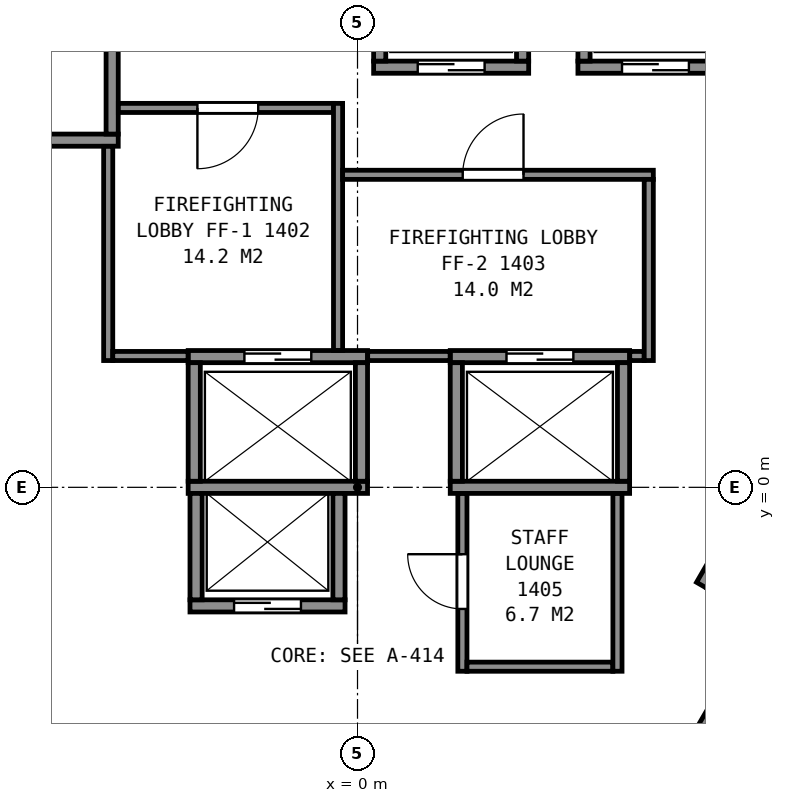
"""IFC4 building model, lengths in metres.
Left out: names, types, materials, properties, quantities, classifications, styles, units other than length and angle.
Written with IfcOpenShell. Run it as: python <this file> out.ifc"""

import sys

from ifc_helpers import new_model, si_unit, direction, frame, frame_2d, origin, place, context, subcontext, project, spatial, rectangle, extrude, element, fill, save


model = new_model("IFC4")
c1 = context("Model", 3, precision=1e-05, world=origin(), true_north=direction((0.0, 1.0)))
c2 = subcontext(c1, "Body", "Model", "MODEL_VIEW")
j1 = project(units=[si_unit("LENGTHUNIT", "METRE"), si_unit("PLANEANGLEUNIT", "RADIAN")], contexts=[c1])
p1 = place(None, origin())
s1 = spatial("IfcSite", under=j1, at=p1, CompositionType="ELEMENT")
p2 = place(p1, origin())
s2 = spatial("IfcBuilding", under=s1, at=p2, CompositionType="ELEMENT")
p3 = place(p2, frame((0.0, 0.0, 65.6)))
s3 = spatial("IfcBuildingStorey", under=s2, at=p3, CompositionType="ELEMENT", Elevation=65.6)
p4 = place(p3, frame((-2.755, -1.95, 0.0), z_axis=(0.0, 0.0, 1.0), x_axis=(1.0, 0.0, 0.0)))
e1 = element("IfcWall", 1, at=p4, inside=s3, PredefinedType="PARTITIONING", context=c2, shape_type="SweptSolid", body=[
    extrude(rectangle(XDim=2.55, YDim=0.2, at=frame_2d((1.275, 0.0))), origin(), (0.0, 0.0, 1.0), 3.6),
])
p5 = place(p4, frame((0.725, 0.0, 0.0)))
e2 = element("IfcOpeningElement", 2, at=p5, cuts=e1, PredefinedType="OPENING", context=c2, shape_type="SweptSolid", body=[
    extrude(rectangle(XDim=1.1, YDim=2.1, at=frame_2d((0.55, 1.05))), frame((0.0, 0.11, 0.0), z_axis=(0.0, -1.0, 0.0), x_axis=(1.0, 0.0, 0.0)), (0.0, 0.0, 1.0), 0.22),
])
p6 = place(p3, frame((-2.785, 0.0, 0.0), z_axis=(0.0, 0.0, 1.0), x_axis=(1.0, 0.0, 0.0)))
e3 = element("IfcWall", 3, at=p6, inside=s3, PredefinedType="PARTITIONING", context=c2, shape_type="SweptSolid", body=[
    extrude(rectangle(XDim=2.95, YDim=0.2, at=frame_2d((1.475, 0.0))), origin(), (0.0, 0.0, 1.0), 3.6),
])
p7 = place(p3, frame((1.525, 0.0, 0.0), z_axis=(0.0, 0.0, 1.0), x_axis=(1.0, 0.0, 0.0)))
e4 = element("IfcWall", 4, at=p7, inside=s3, PredefinedType="PARTITIONING", context=c2, shape_type="SweptSolid", body=[
    extrude(rectangle(XDim=2.95, YDim=0.2, at=frame_2d((1.475, 0.0))), origin(), (0.0, 0.0, 1.0), 3.6),
])
p8 = place(p3, frame((-2.785, 2.15, 0.0), z_axis=(0.0, 0.0, 1.0), x_axis=(1.0, 0.0, 0.0)))
e5 = element("IfcWall", 5, at=p8, inside=s3, PredefinedType="PARTITIONING", context=c2, shape_type="SweptSolid", body=[
    extrude(rectangle(XDim=2.95, YDim=0.2, at=frame_2d((1.475, 0.0))), origin(), (0.0, 0.0, 1.0), 3.6),
])
p9 = place(p8, frame((0.925, 0.0, 0.0)))
e6 = element("IfcOpeningElement", 6, at=p9, cuts=e5, PredefinedType="OPENING", context=c2, shape_type="SweptSolid", body=[
    extrude(rectangle(XDim=1.1, YDim=2.1, at=frame_2d((0.55, 1.05))), frame((0.0, 0.11, 0.0), z_axis=(0.0, -1.0, 0.0), x_axis=(1.0, 0.0, 0.0)), (0.0, 0.0, 1.0), 0.22),
])
p10 = place(p3, frame((1.525, 2.15, 0.0), z_axis=(0.0, 0.0, 1.0), x_axis=(1.0, 0.0, 0.0)))
e7 = element("IfcWall", 7, at=p10, inside=s3, PredefinedType="PARTITIONING", context=c2, shape_type="SweptSolid", body=[
    extrude(rectangle(XDim=2.95, YDim=0.2, at=frame_2d((1.475, 0.0))), origin(), (0.0, 0.0, 1.0), 3.6),
])
p11 = place(p10, frame((0.925, 0.0, 0.0)))
e8 = element("IfcOpeningElement", 8, at=p11, cuts=e7, PredefinedType="OPENING", context=c2, shape_type="SweptSolid", body=[
    extrude(rectangle(XDim=1.1, YDim=2.1, at=frame_2d((0.55, 1.05))), frame((0.0, 0.11, 0.0), z_axis=(0.0, -1.0, 0.0), x_axis=(1.0, 0.0, 0.0)), (0.0, 0.0, 1.0), 0.22),
])
p12 = place(p3, frame((-6.285, 5.71, 0.0), z_axis=(0.0, 0.0, 1.0), x_axis=(1.0, 0.0, 0.0)))
e9 = element("IfcWall", 9, at=p12, inside=s3, PredefinedType="PARTITIONING", context=c2, shape_type="SweptSolid", body=[
    extrude(rectangle(XDim=2.35, YDim=0.2, at=frame_2d((1.175, 0.0))), origin(), (0.0, 0.0, 1.0), 3.6),
])
p13 = place(p3, frame((0.265, 6.91, 0.0), z_axis=(0.0, 0.0, 1.0), x_axis=(1.0, 0.0, 0.0)))
e10 = element("IfcWall", 10, at=p13, inside=s3, PredefinedType="PARTITIONING", context=c2, shape_type="SweptSolid", body=[
    extrude(rectangle(XDim=2.55, YDim=0.2, at=frame_2d((1.275, 0.0))), origin(), (0.0, 0.0, 1.0), 3.6),
])
p14 = place(p13, frame((0.725, 0.0, 0.0)))
e11 = element("IfcOpeningElement", 11, at=p14, cuts=e10, PredefinedType="OPENING", context=c2, shape_type="SweptSolid", body=[
    extrude(rectangle(XDim=1.1, YDim=2.1, at=frame_2d((0.55, 1.05))), frame((0.0, 0.11, 0.0), z_axis=(0.0, -1.0, 0.0), x_axis=(1.0, 0.0, 0.0)), (0.0, 0.0, 1.0), 0.22),
])
p15 = place(p3, frame((3.625, 6.91, 0.0), z_axis=(0.0, 0.0, 1.0), x_axis=(1.0, 0.0, 0.0)))
e12 = element("IfcWall", 12, at=p15, inside=s3, PredefinedType="PARTITIONING", context=c2, shape_type="SweptSolid", body=[
    extrude(rectangle(XDim=2.55, YDim=0.2, at=frame_2d((1.275, 0.0))), origin(), (0.0, 0.0, 1.0), 3.6),
])
p16 = place(p15, frame((0.725, 0.0, 0.0)))
e13 = element("IfcOpeningElement", 13, at=p16, cuts=e12, PredefinedType="OPENING", context=c2, shape_type="SweptSolid", body=[
    extrude(rectangle(XDim=1.1, YDim=2.1, at=frame_2d((0.55, 1.05))), frame((0.0, 0.11, 0.0), z_axis=(0.0, -1.0, 0.0), x_axis=(1.0, 0.0, 0.0)), (0.0, 0.0, 1.0), 0.22),
])
p17 = place(p3, frame((5.527, -4.247, 0.0), z_axis=(0.0, 0.0, 1.0), x_axis=(0.499938297808, 0.866061024631, 0.0)))
e14 = element("IfcWall", 14, at=p17, inside=s3, PredefinedType="PARTITIONING", context=c2, shape_type="SweptSolid", body=[
    extrude(rectangle(XDim=2.35, YDim=0.2, at=frame_2d((1.175, 0.0))), origin(), (0.0, 0.0, 1.0), 3.6),
])
p18 = place(p17, frame((0.725, 0.0, 0.0)))
e15 = element("IfcOpeningElement", 15, at=p18, cuts=e14, PredefinedType="OPENING", context=c2, shape_type="SweptSolid", body=[
    extrude(rectangle(XDim=1.1, YDim=2.1, at=frame_2d((0.55, 1.05))), frame((0.0, 0.11, 0.0), z_axis=(0.0, -1.0, 0.0), x_axis=(1.0, 0.0, 0.0)), (0.0, 0.0, 1.0), 0.22),
])
p19 = place(p3, frame((5.663, -1.612, 0.0), z_axis=(0.0, 0.0, 1.0), x_axis=(0.49998122708, 0.866036242063, 0.0)))
e16 = element("IfcWall", 16, at=p19, inside=s3, PredefinedType="PARTITIONING", context=c2, shape_type="SweptSolid", body=[
    extrude(rectangle(XDim=4.9, YDim=0.2, at=frame_2d((2.45, 0.0))), origin(), (0.0, 0.0, 1.0), 3.6),
])
p20 = place(p3, frame((4.375, 0.1, 0.0), z_axis=(0.0, 0.0, 1.0), x_axis=(0.0, 1.0, 0.0)))
e17 = element("IfcWall", 17, at=p20, inside=s3, PredefinedType="PARTITIONING", context=c2, shape_type="SweptSolid", body=[
    extrude(rectangle(XDim=1.95, YDim=0.2, at=frame_2d((0.975, 0.0))), origin(), (0.0, 0.0, 1.0), 3.6),
])
for number, where, z_axis, x_axis in (
    (18, (3.725, 7.01, 0.0), (0.0, 0.0, 1.0), (0.0, 1.0, 0.0)),
    (19, (2.715, 7.01, 0.0), (0.0, 0.0, 1.0), (0.0, 1.0, 0.0)),
):
    element("IfcWall", number, at=place(p3, frame(where, z_axis=z_axis, x_axis=x_axis)), inside=s3, PredefinedType="PARTITIONING", context=c2, shape_type="SweptSolid", body=[
        extrude(rectangle(XDim=1.75, YDim=0.2, at=frame_2d((0.875, 0.0))), origin(), (0.0, 0.0, 1.0), 3.6),
    ])
p21 = place(p3, frame((1.625, 0.1, 0.0), z_axis=(0.0, 0.0, 1.0), x_axis=(0.0, 1.0, 0.0)))
e20 = element("IfcWall", 20, at=p21, inside=s3, PredefinedType="PARTITIONING", context=c2, shape_type="SweptSolid", body=[
    extrude(rectangle(XDim=1.95, YDim=0.2, at=frame_2d((0.975, 0.0))), origin(), (0.0, 0.0, 1.0), 3.6),
])
p22 = place(p3, frame((0.365, 7.01, 0.0), z_axis=(0.0, 0.0, 1.0), x_axis=(0.0, 1.0, 0.0)))
e21 = element("IfcWall", 21, at=p22, inside=s3, PredefinedType="PARTITIONING", context=c2, shape_type="SweptSolid", body=[
    extrude(rectangle(XDim=1.75, YDim=0.2, at=frame_2d((0.875, 0.0))), origin(), (0.0, 0.0, 1.0), 3.6),
])
p23 = place(p3, frame((0.065, 0.1, 0.0), z_axis=(0.0, 0.0, 1.0), x_axis=(0.0, 1.0, 0.0)))
e22 = element("IfcWall", 22, at=p23, inside=s3, PredefinedType="PARTITIONING", context=c2, shape_type="SweptSolid", body=[
    extrude(rectangle(XDim=1.95, YDim=0.2, at=frame_2d((0.975, 0.0))), origin(), (0.0, 0.0, 1.0), 3.6),
])
for number, where, z_axis, x_axis in (
    (23, (-0.305, -1.85, 0.0), (0.0, 0.0, 1.0), (0.0, 1.0, 0.0)),
    (24, (-2.655, -1.85, 0.0), (0.0, 0.0, 1.0), (0.0, 1.0, 0.0)),
):
    element("IfcWall", number, at=place(p3, frame(where, z_axis=z_axis, x_axis=x_axis)), inside=s3, PredefinedType="PARTITIONING", context=c2, shape_type="SweptSolid", body=[
        extrude(rectangle(XDim=1.75, YDim=0.2, at=frame_2d((0.875, 0.0))), origin(), (0.0, 0.0, 1.0), 3.6),
    ])
p24 = place(p3, frame((-2.685, 0.1, 0.0), z_axis=(0.0, 0.0, 1.0), x_axis=(0.0, 1.0, 0.0)))
e25 = element("IfcWall", 25, at=p24, inside=s3, PredefinedType="PARTITIONING", context=c2, shape_type="SweptSolid", body=[
    extrude(rectangle(XDim=1.95, YDim=0.2, at=frame_2d((0.975, 0.0))), origin(), (0.0, 0.0, 1.0), 3.6),
])
p25 = place(p3, frame((-4.035, 5.81, 0.0), z_axis=(0.0, 0.0, 1.0), x_axis=(0.0, 1.0, 0.0)))
e26 = element("IfcWall", 26, at=p25, inside=s3, PredefinedType="PARTITIONING", context=c2, shape_type="SweptSolid", body=[
    extrude(rectangle(XDim=1.75, YDim=0.2, at=frame_2d((0.875, 0.0))), origin(), (0.0, 0.0, 1.0), 3.6),
])
p26 = place(p3, frame((-13.664, 5.946, 0.0), z_axis=(0.0, 0.0, 1.0), x_axis=(0.499994327219, -0.866028678941, 0.0)))
e27 = element("IfcWall", 27, at=p26, inside=s3, PredefinedType="PARTITIONING", context=c2, shape_type="SweptSolid", body=[
    extrude(rectangle(XDim=23.968, YDim=0.2, at=frame_2d((11.984, 0.0))), origin(), (0.0, 0.0, 1.0), 3.35),
])
p27 = place(p3, frame((-4.152, -5.729, 0.0), z_axis=(0.0, 0.0, 1.0), x_axis=(-0.500024287448, 0.866011380966, 0.0)))
e28 = element("IfcWall", 28, at=p27, inside=s3, PredefinedType="PARTITIONING", context=c2, shape_type="SweptSolid", body=[
    extrude(rectangle(XDim=3.501, YDim=0.15, at=frame_2d((1.75, 0.0))), origin(), (0.0, 0.0, 1.0), 3.35),
])
p28 = place(p27, frame((2.026, 0.0, 0.0)))
e29 = element("IfcOpeningElement", 29, at=p28, cuts=e28, PredefinedType="OPENING", context=c2, shape_type="SweptSolid", body=[
    extrude(rectangle(XDim=0.9, YDim=2.1, at=frame_2d((0.45, 1.05))), frame((0.0, 0.085, 0.0), z_axis=(0.0, -1.0, 0.0), x_axis=(1.0, 0.0, 0.0)), (0.0, 0.0, 1.0), 0.17),
])
p29 = place(p27, frame((0.248, 0.0, 0.0)))
e30 = element("IfcOpeningElement", 30, at=p29, cuts=e28, PredefinedType="OPENING", context=c2, shape_type="SweptSolid", body=[
    extrude(rectangle(XDim=0.9, YDim=2.1, at=frame_2d((0.45, 1.05))), frame((0.0, 0.085, 0.0), z_axis=(0.0, -1.0, 0.0), x_axis=(1.0, 0.0, 0.0)), (0.0, 0.0, 1.0), 0.17),
])
p30 = place(p3, frame((-4.1, 2.085, 0.0), z_axis=(0.0, 0.0, 1.0), x_axis=(0.0, 1.0, 0.0)))
e31 = element("IfcWall", 31, at=p30, inside=s3, PredefinedType="PARTITIONING", context=c2, shape_type="SweptSolid", body=[
    extrude(rectangle(XDim=3.523, YDim=0.15, at=frame_2d((1.761, 0.0))), origin(), (0.0, 0.0, 1.0), 3.35),
])
p31 = place(p3, frame((-4.025, 2.16, 0.0), z_axis=(0.0, 0.0, 1.0), x_axis=(1.0, 0.0, 0.0)))
e32 = element("IfcWall", 32, at=p31, inside=s3, PredefinedType="PARTITIONING", context=c2, shape_type="SweptSolid", body=[
    extrude(rectangle(XDim=1.238, YDim=0.15, at=frame_2d((0.619, 0.0))), origin(), (0.0, 0.0, 1.0), 3.35),
])
p32 = place(p3, frame((-3.933, 6.24, 0.0), z_axis=(0.0, 0.0, 1.0), x_axis=(1.0, 0.0, 0.0)))
e33 = element("IfcWall", 33, at=p32, inside=s3, PredefinedType="PARTITIONING", context=c2, shape_type="SweptSolid", body=[
    extrude(rectangle(XDim=3.538, YDim=0.15, at=frame_2d((1.769, 0.0))), origin(), (0.0, 0.0, 1.0), 3.35),
])
p33 = place(p32, frame((1.3, 0.0, 0.0)))
e34 = element("IfcOpeningElement", 34, at=p33, cuts=e33, PredefinedType="OPENING", context=c2, shape_type="SweptSolid", body=[
    extrude(rectangle(XDim=1.0, YDim=2.1, at=frame_2d((0.5, 1.05))), frame((0.0, 0.085, 0.0), z_axis=(0.0, -1.0, 0.0), x_axis=(1.0, 0.0, 0.0)), (0.0, 0.0, 1.0), 0.17),
])
p34 = place(p3, frame((-0.32, 2.252, 0.0), z_axis=(0.0, 0.0, 1.0), x_axis=(0.0, 1.0, 0.0)))
e35 = element("IfcWall", 35, at=p34, inside=s3, PredefinedType="PARTITIONING", context=c2, shape_type="SweptSolid", body=[
    extrude(rectangle(XDim=4.063, YDim=0.15, at=frame_2d((2.031, 0.0))), origin(), (0.0, 0.0, 1.0), 3.35),
])
p35 = place(p3, frame((-0.245, 5.14, 0.0), z_axis=(0.0, 0.0, 1.0), x_axis=(1.0, 0.0, 0.0)))
e36 = element("IfcWall", 36, at=p35, inside=s3, PredefinedType="PARTITIONING", context=c2, shape_type="SweptSolid", body=[
    extrude(rectangle(XDim=5.11, YDim=0.15, at=frame_2d((2.555, 0.0))), origin(), (0.0, 0.0, 1.0), 3.35),
])
p36 = place(p35, frame((1.975, 0.0, 0.0)))
e37 = element("IfcOpeningElement", 37, at=p36, cuts=e36, PredefinedType="OPENING", context=c2, shape_type="SweptSolid", body=[
    extrude(rectangle(XDim=1.0, YDim=2.1, at=frame_2d((0.5, 1.05))), frame((0.0, 0.085, 0.0), z_axis=(0.0, -1.0, 0.0), x_axis=(1.0, 0.0, 0.0)), (0.0, 0.0, 1.0), 0.17),
])
p37 = place(p3, frame((0.167, 2.16, 0.0), z_axis=(0.0, 0.0, 1.0), x_axis=(1.0, 0.0, 0.0)))
e38 = element("IfcWall", 38, at=p37, inside=s3, PredefinedType="PARTITIONING", context=c2, shape_type="SweptSolid", body=[
    extrude(rectangle(XDim=1.356, YDim=0.15, at=frame_2d((0.678, 0.0))), origin(), (0.0, 0.0, 1.0), 3.35),
])
p38 = place(p3, frame((1.725, -0.102, 0.0), z_axis=(0.0, 0.0, 1.0), x_axis=(0.0, -1.0, 0.0)))
e39 = element("IfcWall", 39, at=p38, inside=s3, PredefinedType="PARTITIONING", context=c2, shape_type="SweptSolid", body=[
    extrude(rectangle(XDim=2.923, YDim=0.15, at=frame_2d((1.461, 0.0))), origin(), (0.0, 0.0, 1.0), 3.35),
])
p39 = place(p38, frame((0.998, 0.0, 0.0)))
e40 = element("IfcOpeningElement", 40, at=p39, cuts=e39, PredefinedType="OPENING", context=c2, shape_type="SweptSolid", body=[
    extrude(rectangle(XDim=0.9, YDim=2.1, at=frame_2d((0.45, 1.05))), frame((0.0, 0.085, 0.0), z_axis=(0.0, -1.0, 0.0), x_axis=(1.0, 0.0, 0.0)), (0.0, 0.0, 1.0), 0.17),
])
p40 = place(p3, frame((1.8, -2.95, 0.0), z_axis=(0.0, 0.0, 1.0), x_axis=(1.0, 0.0, 0.0)))
e41 = element("IfcWall", 41, at=p40, inside=s3, PredefinedType="PARTITIONING", context=c2, shape_type="SweptSolid", body=[
    extrude(rectangle(XDim=2.4, YDim=0.15, at=frame_2d((1.2, 0.0))), origin(), (0.0, 0.0, 1.0), 3.35),
])
p41 = place(p3, frame((4.275, -3.025, 0.0), z_axis=(0.0, 0.0, 1.0), x_axis=(0.0, 1.0, 0.0)))
e42 = element("IfcWall", 42, at=p41, inside=s3, PredefinedType="PARTITIONING", context=c2, shape_type="SweptSolid", body=[
    extrude(rectangle(XDim=2.923, YDim=0.15, at=frame_2d((1.461, 0.0))), origin(), (0.0, 0.0, 1.0), 3.35),
])
p42 = place(p3, frame((4.477, 2.16, 0.0), z_axis=(0.0, 0.0, 1.0), x_axis=(1.0, 0.0, 0.0)))
e43 = element("IfcWall", 43, at=p42, inside=s3, PredefinedType="PARTITIONING", context=c2, shape_type="SweptSolid", body=[
    extrude(rectangle(XDim=0.238, YDim=0.15, at=frame_2d((0.119, 0.0))), origin(), (0.0, 0.0, 1.0), 3.35),
])
p43 = place(p3, frame((4.79, 2.085, 0.0), z_axis=(0.0, 0.0, 1.0), x_axis=(0.0, 1.0, 0.0)))
e44 = element("IfcWall", 44, at=p43, inside=s3, PredefinedType="PARTITIONING", context=c2, shape_type="SweptSolid", body=[
    extrude(rectangle(XDim=2.98, YDim=0.15, at=frame_2d((1.49, 0.0))), origin(), (0.0, 0.0, 1.0), 3.35),
])
p44 = place(p3, frame((-3.766, -18.358, 0.0), z_axis=(0.0, 0.0, 1.0), x_axis=(-0.500003973642, 0.866023109589, 0.0)))
e45 = element("IfcWall", 45, at=p44, inside=s3, PredefinedType="PARTITIONING", context=c2, shape_type="SweptSolid", body=[
    extrude(rectangle(XDim=28.826, YDim=0.125, at=frame_2d((14.413, 0.0))), origin(), (0.0, 0.0, 1.0), 2.613),
])
p45 = place(p44, frame((27.114, 0.0, 0.0)))
e46 = element("IfcOpeningElement", 46, at=p45, cuts=e45, PredefinedType="OPENING", context=c2, shape_type="SweptSolid", body=[
    extrude(rectangle(XDim=0.9, YDim=2.1, at=frame_2d((0.45, 1.05))), frame((0.0, 0.073, 0.0), z_axis=(0.0, -1.0, 0.0), x_axis=(1.0, 0.0, 0.0)), (0.0, 0.0, 1.0), 0.145),
])
p46 = place(p44, frame((20.322, 0.0, 0.0)))
e47 = element("IfcOpeningElement", 47, at=p46, cuts=e45, PredefinedType="OPENING", context=c2, shape_type="SweptSolid", body=[
    extrude(rectangle(XDim=0.9, YDim=2.1, at=frame_2d((0.45, 1.05))), frame((0.0, 0.073, 0.0), z_axis=(0.0, -1.0, 0.0), x_axis=(1.0, 0.0, 0.0)), (0.0, 0.0, 1.0), 0.145),
])
p47 = place(p44, frame((17.68, 0.0, 0.0)))
e48 = element("IfcOpeningElement", 48, at=p47, cuts=e45, PredefinedType="OPENING", context=c2, shape_type="SweptSolid", body=[
    extrude(rectangle(XDim=0.9, YDim=2.1, at=frame_2d((0.45, 1.05))), frame((0.0, 0.073, 0.0), z_axis=(0.0, -1.0, 0.0), x_axis=(1.0, 0.0, 0.0)), (0.0, 0.0, 1.0), 0.145),
])
p48 = place(p44, frame((10.836, 0.0, 0.0)))
e49 = element("IfcOpeningElement", 49, at=p48, cuts=e45, PredefinedType="OPENING", context=c2, shape_type="SweptSolid", body=[
    extrude(rectangle(XDim=0.9, YDim=2.1, at=frame_2d((0.45, 1.05))), frame((0.0, 0.073, 0.0), z_axis=(0.0, -1.0, 0.0), x_axis=(1.0, 0.0, 0.0)), (0.0, 0.0, 1.0), 0.145),
])
p49 = place(p44, frame((7.342, 0.0, 0.0)))
e50 = element("IfcOpeningElement", 50, at=p49, cuts=e45, PredefinedType="OPENING", context=c2, shape_type="SweptSolid", body=[
    extrude(rectangle(XDim=0.9, YDim=2.1, at=frame_2d((0.45, 1.05))), frame((0.0, 0.073, 0.0), z_axis=(0.0, -1.0, 0.0), x_axis=(1.0, 0.0, 0.0)), (0.0, 0.0, 1.0), 0.145),
])
p50 = place(p3, frame((18.179, 6.606, 0.0), z_axis=(0.0, 0.0, 1.0), x_axis=(-0.500003973642, -0.866023109589, 0.0)))
e51 = element("IfcWall", 51, at=p50, inside=s3, PredefinedType="PARTITIONING", context=c2, shape_type="SweptSolid", body=[
    extrude(rectangle(XDim=28.826, YDim=0.125, at=frame_2d((14.413, 0.0))), origin(), (0.0, 0.0, 1.0), 2.613),
])
p51 = place(p50, frame((21.501, 0.0, 0.0)))
e52 = element("IfcOpeningElement", 52, at=p51, cuts=e51, PredefinedType="OPENING", context=c2, shape_type="SweptSolid", body=[
    extrude(rectangle(XDim=0.9, YDim=2.1, at=frame_2d((0.45, 1.05))), frame((0.0, 0.073, 0.0), z_axis=(0.0, -1.0, 0.0), x_axis=(1.0, 0.0, 0.0)), (0.0, 0.0, 1.0), 0.145),
])
p52 = place(p50, frame((18.894, 0.0, 0.0)))
e53 = element("IfcOpeningElement", 53, at=p52, cuts=e51, PredefinedType="OPENING", context=c2, shape_type="SweptSolid", body=[
    extrude(rectangle(XDim=0.9, YDim=2.1, at=frame_2d((0.45, 1.05))), frame((0.0, 0.073, 0.0), z_axis=(0.0, -1.0, 0.0), x_axis=(1.0, 0.0, 0.0)), (0.0, 0.0, 1.0), 0.145),
])
p53 = place(p50, frame((10.937, 0.0, 0.0)))
e54 = element("IfcOpeningElement", 54, at=p53, cuts=e51, PredefinedType="OPENING", context=c2, shape_type="SweptSolid", body=[
    extrude(rectangle(XDim=0.9, YDim=2.1, at=frame_2d((0.45, 1.05))), frame((0.0, 0.073, 0.0), z_axis=(0.0, -1.0, 0.0), x_axis=(1.0, 0.0, 0.0)), (0.0, 0.0, 1.0), 0.145),
])
p54 = place(p50, frame((7.535, 0.0, 0.0)))
e55 = element("IfcOpeningElement", 55, at=p54, cuts=e51, PredefinedType="OPENING", context=c2, shape_type="SweptSolid", body=[
    extrude(rectangle(XDim=0.9, YDim=2.1, at=frame_2d((0.45, 1.05))), frame((0.0, 0.073, 0.0), z_axis=(0.0, -1.0, 0.0), x_axis=(1.0, 0.0, 0.0)), (0.0, 0.0, 1.0), 0.145),
])
p55 = place(p50, frame((0.827, 0.0, 0.0)))
e56 = element("IfcOpeningElement", 56, at=p55, cuts=e51, PredefinedType="OPENING", context=c2, shape_type="SweptSolid", body=[
    extrude(rectangle(XDim=0.9, YDim=2.1, at=frame_2d((0.45, 1.05))), frame((0.0, 0.073, 0.0), z_axis=(0.0, -1.0, 0.0), x_axis=(1.0, 0.0, 0.0)), (0.0, 0.0, 1.0), 0.145),
])
p56 = place(p14, origin())
e57 = element("IfcDoor", 57, at=p56, inside=s3, OperationType="SLIDING_TO_LEFT", PredefinedType="DOOR", context=c2, shape_type="SweptSolid", body=[
    extrude(rectangle(XDim=1.1, YDim=2.1, at=frame_2d((0.55, 1.05))), frame((0.0, 0.025, 0.0), z_axis=(0.0, -1.0, 0.0), x_axis=(1.0, 0.0, 0.0)), (0.0, 0.0, 1.0), 0.05),
])
fill(e11, e57)
p57 = place(p5, origin())
e58 = element("IfcDoor", 58, at=p57, inside=s3, OperationType="SLIDING_TO_RIGHT", PredefinedType="DOOR", context=c2, shape_type="SweptSolid", body=[
    extrude(rectangle(XDim=1.1, YDim=2.1, at=frame_2d((0.55, 1.05))), frame((0.0, 0.025, 0.0), z_axis=(0.0, -1.0, 0.0), x_axis=(1.0, 0.0, 0.0)), (0.0, 0.0, 1.0), 0.05),
])
fill(e2, e58)
p58 = place(p16, origin())
e59 = element("IfcDoor", 59, at=p58, inside=s3, OperationType="SLIDING_TO_LEFT", PredefinedType="DOOR", context=c2, shape_type="SweptSolid", body=[
    extrude(rectangle(XDim=1.1, YDim=2.1, at=frame_2d((0.55, 1.05))), frame((0.0, 0.025, 0.0), z_axis=(0.0, -1.0, 0.0), x_axis=(1.0, 0.0, 0.0)), (0.0, 0.0, 1.0), 0.05),
])
fill(e13, e59)
p59 = place(p9, origin())
e60 = element("IfcDoor", 60, at=p59, inside=s3, OperationType="SLIDING_TO_LEFT", PredefinedType="DOOR", context=c2, shape_type="SweptSolid", body=[
    extrude(rectangle(XDim=1.1, YDim=2.1, at=frame_2d((0.55, 1.05))), frame((0.0, 0.025, 0.0), z_axis=(0.0, -1.0, 0.0), x_axis=(1.0, 0.0, 0.0)), (0.0, 0.0, 1.0), 0.05),
])
fill(e6, e60)
p60 = place(p11, origin())
e61 = element("IfcDoor", 61, at=p60, inside=s3, OperationType="SLIDING_TO_RIGHT", PredefinedType="DOOR", context=c2, shape_type="SweptSolid", body=[
    extrude(rectangle(XDim=1.1, YDim=2.1, at=frame_2d((0.55, 1.05))), frame((0.0, 0.025, 0.0), z_axis=(0.0, -1.0, 0.0), x_axis=(1.0, 0.0, 0.0)), (0.0, 0.0, 1.0), 0.05),
])
fill(e8, e61)
p61 = place(p33, origin())
e62 = element("IfcDoor", 62, at=p61, inside=s3, OperationType="SINGLE_SWING_LEFT", PredefinedType="DOOR", context=c2, shape_type="SweptSolid", body=[
    extrude(rectangle(XDim=1.0, YDim=2.1, at=frame_2d((0.5, 1.05))), frame((0.0, 0.025, 0.0), z_axis=(0.0, -1.0, 0.0), x_axis=(1.0, 0.0, 0.0)), (0.0, 0.0, 1.0), 0.05),
])
fill(e34, e62)
p62 = place(p36, origin())
e63 = element("IfcDoor", 63, at=p62, inside=s3, OperationType="SINGLE_SWING_RIGHT", PredefinedType="DOOR", context=c2, shape_type="SweptSolid", body=[
    extrude(rectangle(XDim=1.0, YDim=2.1, at=frame_2d((0.5, 1.05))), frame((0.0, 0.025, 0.0), z_axis=(0.0, -1.0, 0.0), x_axis=(1.0, 0.0, 0.0)), (0.0, 0.0, 1.0), 0.05),
])
fill(e37, e63)
p63 = place(p39, origin())
e64 = element("IfcDoor", 64, at=p63, inside=s3, OperationType="SINGLE_SWING_LEFT", PredefinedType="DOOR", context=c2, shape_type="SweptSolid", body=[
    extrude(rectangle(XDim=0.9, YDim=2.1, at=frame_2d((0.45, 1.05))), frame((0.0, 0.025, 0.0), z_axis=(0.0, -1.0, 0.0), x_axis=(1.0, 0.0, 0.0)), (0.0, 0.0, 1.0), 0.05),
])
fill(e40, e64)
save(model, sys.argv[1])
